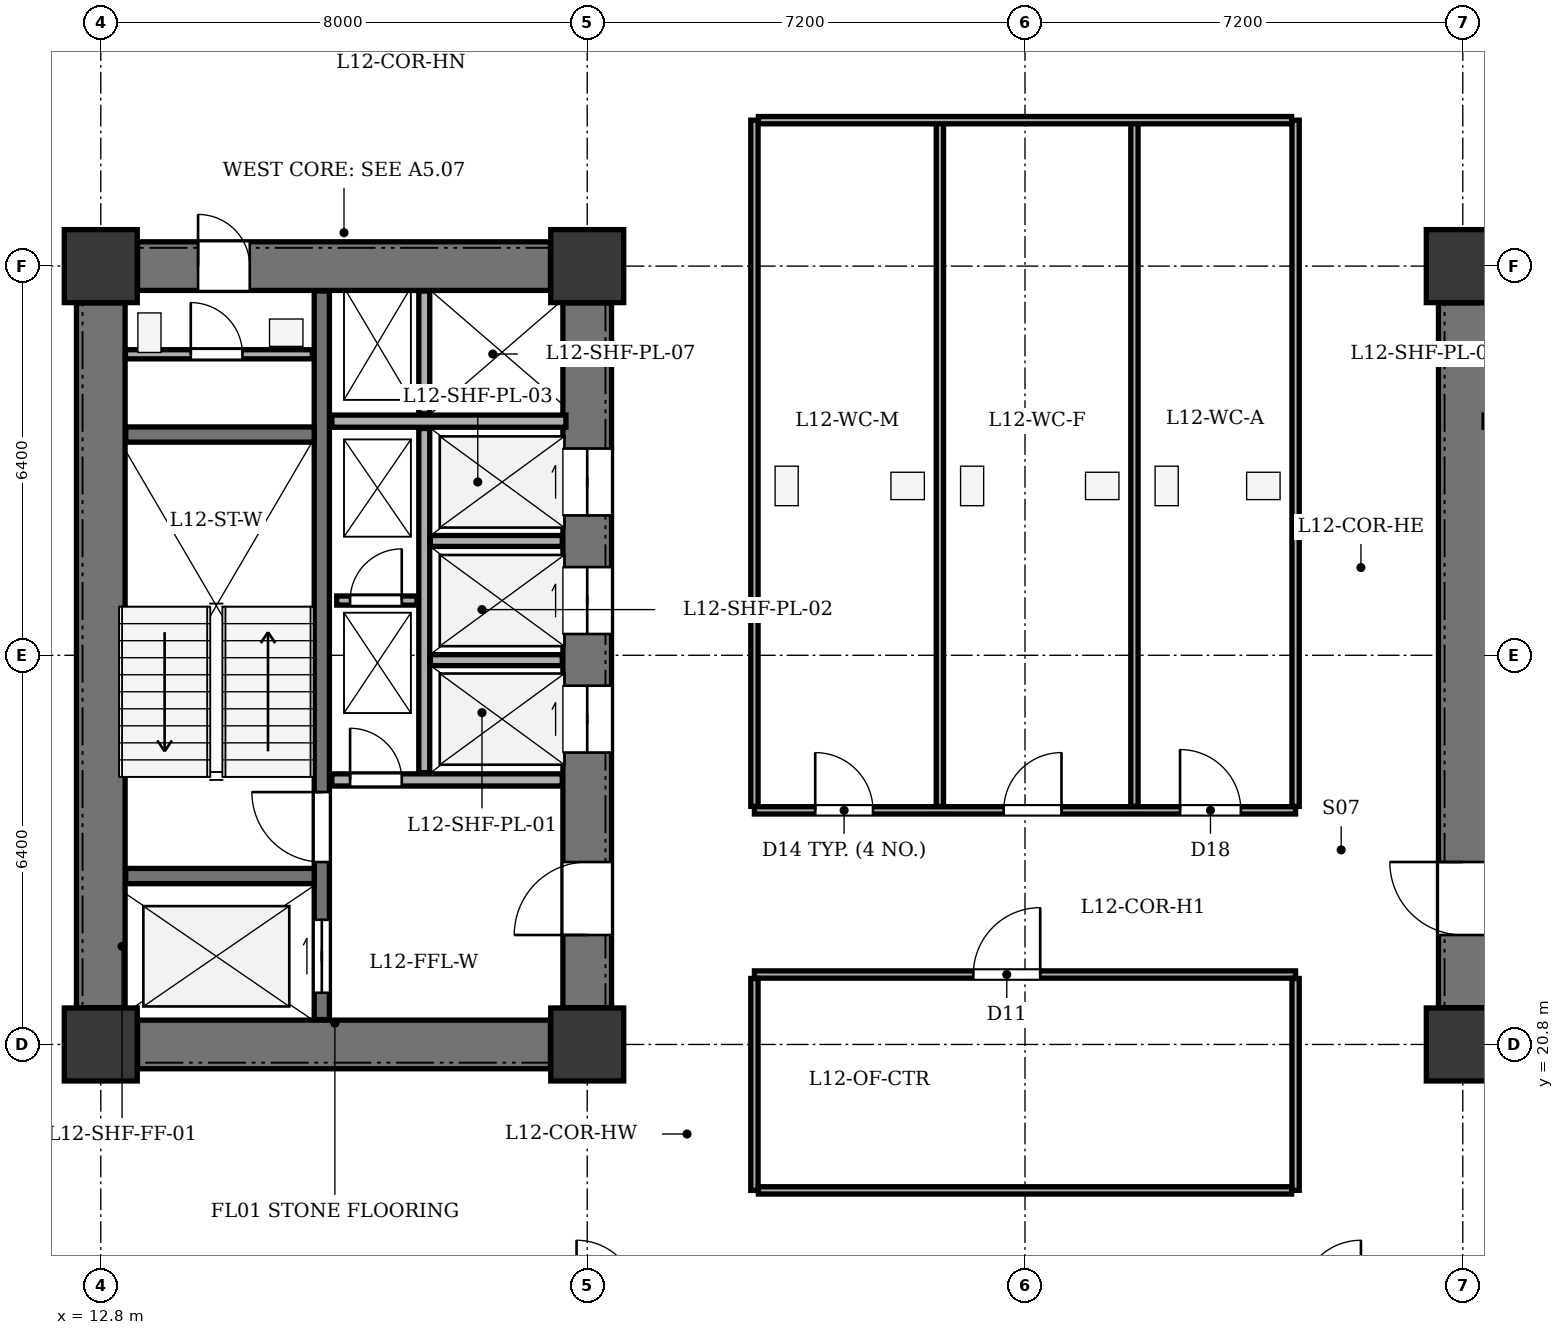
"""IFC4 building model, lengths in metres.
Left out: names, types, materials, properties, quantities, classifications, styles, units other than length and angle.
Written with IfcOpenShell. Run it as: python <this file> out.ifc"""

import sys

from ifc_helpers import new_model, si_unit, direction, frame, frame_2d, origin, origin_2d, place, context, subcontext, project, spatial, rectangle, extrude, element, fill, save


model = new_model("IFC4")
c1 = context("Model", 3, precision=1e-05, world=origin(), true_north=direction((0.0, 1.0)))
c2 = subcontext(c1, "Body", "Model", "MODEL_VIEW")
j1 = project(units=[si_unit("LENGTHUNIT", "METRE"), si_unit("PLANEANGLEUNIT", "RADIAN")], contexts=[c1])
p1 = place(None, origin())
s1 = spatial("IfcSite", under=j1, at=p1, CompositionType="ELEMENT")
p2 = place(p1, origin())
s2 = spatial("IfcBuilding", under=s1, at=p2, CompositionType="ELEMENT")
p3 = place(p2, frame((0.0, 0.0, 51.6)))
s3 = spatial("IfcBuildingStorey", under=s2, at=p3, CompositionType="ELEMENT", Elevation=51.6)
for number, where, z_axis, x_axis in (
    (1, (12.8, 20.8, 0.0), (0.0, 0.0, 1.0), (1.0, 0.0, 0.0)),
    (2, (20.8, 20.8, 0.0), (0.0, 0.0, 1.0), (1.0, 0.0, 0.0)),
    (3, (12.8, 33.6, 0.0), (0.0, 0.0, 1.0), (1.0, 0.0, 0.0)),
    (4, (20.8, 33.6, 0.0), (0.0, 0.0, 1.0), (1.0, 0.0, 0.0)),
    (5, (35.2, 20.8, 0.0), (0.0, 0.0, 1.0), (1.0, 0.0, 0.0)),
    (6, (35.2, 33.6, 0.0), (0.0, 0.0, 1.0), (1.0, 0.0, 0.0)),
):
    element("IfcColumn", number, at=place(p3, frame(where, z_axis=z_axis, x_axis=x_axis)), inside=s3, PredefinedType="COLUMN", context=c2, shape_type="SweptSolid", body=[
        extrude(rectangle(XDim=1.2, YDim=1.2, at=origin_2d()), origin(), (0.0, 0.0, 1.0), 3.9),
    ])
p4 = place(p3, frame((12.8, 21.405, 0.0), z_axis=(0.0, 0.0, 1.0), x_axis=(0.0, 1.0, 0.0)))
e7 = element("IfcWall", 7, at=p4, inside=s3, PredefinedType="SHEAR", context=c2, shape_type="SweptSolid", body=[
    extrude(rectangle(XDim=11.59, YDim=0.8, at=frame_2d((5.795, 0.0))), origin(), (0.0, 0.0, 1.0), 3.6),
])
p5 = place(p3, frame((13.405, 20.8, 0.0), z_axis=(0.0, 0.0, 1.0), x_axis=(1.0, 0.0, 0.0)))
e8 = element("IfcWall", 8, at=p5, inside=s3, PredefinedType="SHEAR", context=c2, shape_type="SweptSolid", body=[
    extrude(rectangle(XDim=6.79, YDim=0.8, at=frame_2d((3.395, 0.0))), origin(), (0.0, 0.0, 1.0), 3.6),
])
p6 = place(p3, frame((13.405, 33.6, 0.0), z_axis=(0.0, 0.0, 1.0), x_axis=(1.0, 0.0, 0.0)))
e9 = element("IfcWall", 9, at=p6, inside=s3, PredefinedType="SHEAR", context=c2, shape_type="SweptSolid", body=[
    extrude(rectangle(XDim=6.79, YDim=0.8, at=frame_2d((3.395, 0.0))), origin(), (0.0, 0.0, 1.0), 3.6),
])
p7 = place(p6, frame((0.995, 0.0, 0.0)))
e10 = element("IfcOpeningElement", 10, at=p7, cuts=e9, PredefinedType="OPENING", context=c2, shape_type="SweptSolid", body=[
    extrude(rectangle(XDim=0.85, YDim=2.02, at=frame_2d((0.425, 1.01))), frame((0.0, 0.41, 0.0), z_axis=(0.0, -1.0, 0.0), x_axis=(1.0, 0.0, 0.0)), (0.0, 0.0, 1.0), 0.82),
])
p8 = place(p3, frame((20.8, 21.405, 0.0), z_axis=(0.0, 0.0, 1.0), x_axis=(0.0, 1.0, 0.0)))
e11 = element("IfcWall", 11, at=p8, inside=s3, PredefinedType="SHEAR", context=c2, shape_type="SweptSolid", body=[
    extrude(rectangle(XDim=11.59, YDim=0.8, at=frame_2d((5.795, 0.0))), origin(), (0.0, 0.0, 1.0), 3.6),
])
p9 = place(p8, frame((1.195, 0.0, 0.0)))
e12 = element("IfcOpeningElement", 12, at=p9, cuts=e11, PredefinedType="OPENING", context=c2, shape_type="SweptSolid", body=[
    extrude(rectangle(XDim=1.2, YDim=2.15, at=frame_2d((0.6, 1.075))), frame((0.0, 0.41, 0.0), z_axis=(0.0, -1.0, 0.0), x_axis=(1.0, 0.0, 0.0)), (0.0, 0.0, 1.0), 0.82),
])
p10 = place(p8, frame((4.195, 0.0, 0.0)))
e13 = element("IfcOpeningElement", 13, at=p10, cuts=e11, PredefinedType="OPENING", context=c2, shape_type="SweptSolid", body=[
    extrude(rectangle(XDim=1.1, YDim=2.1, at=frame_2d((0.55, 1.05))), frame((0.0, 0.41, 0.0), z_axis=(0.0, -1.0, 0.0), x_axis=(1.0, 0.0, 0.0)), (0.0, 0.0, 1.0), 0.82),
])
p11 = place(p8, frame((6.145, 0.0, 0.0)))
e14 = element("IfcOpeningElement", 14, at=p11, cuts=e11, PredefinedType="OPENING", context=c2, shape_type="SweptSolid", body=[
    extrude(rectangle(XDim=1.1, YDim=2.1, at=frame_2d((0.55, 1.05))), frame((0.0, 0.41, 0.0), z_axis=(0.0, -1.0, 0.0), x_axis=(1.0, 0.0, 0.0)), (0.0, 0.0, 1.0), 0.82),
])
p12 = place(p8, frame((8.095, 0.0, 0.0)))
e15 = element("IfcOpeningElement", 15, at=p12, cuts=e11, PredefinedType="OPENING", context=c2, shape_type="SweptSolid", body=[
    extrude(rectangle(XDim=1.1, YDim=2.1, at=frame_2d((0.55, 1.05))), frame((0.0, 0.41, 0.0), z_axis=(0.0, -1.0, 0.0), x_axis=(1.0, 0.0, 0.0)), (0.0, 0.0, 1.0), 0.82),
])
p13 = place(p3, frame((16.435, 21.21, 0.0), z_axis=(0.0, 0.0, 1.0), x_axis=(0.0, 1.0, 0.0)))
e16 = element("IfcWall", 16, at=p13, inside=s3, PredefinedType="SHEAR", context=c2, shape_type="SweptSolid", body=[
    extrude(rectangle(XDim=11.98, YDim=0.25, at=frame_2d((5.99, 0.0))), origin(), (0.0, 0.0, 1.0), 3.6),
])
p14 = place(p13, frame((0.44, 0.0, 0.0)))
e17 = element("IfcOpeningElement", 17, at=p14, cuts=e16, PredefinedType="OPENING", context=c2, shape_type="SweptSolid", body=[
    extrude(rectangle(XDim=1.2, YDim=2.15, at=frame_2d((0.6, 1.075))), frame((0.0, 0.135, 0.0), z_axis=(0.0, -1.0, 0.0), x_axis=(1.0, 0.0, 0.0)), (0.0, 0.0, 1.0), 0.27),
])
p15 = place(p13, frame((2.59, 0.0, 0.0)))
e18 = element("IfcOpeningElement", 18, at=p15, cuts=e16, PredefinedType="OPENING", context=c2, shape_type="SweptSolid", body=[
    extrude(rectangle(XDim=1.15, YDim=2.15, at=frame_2d((0.575, 1.075))), frame((0.0, 0.135, 0.0), z_axis=(0.0, -1.0, 0.0), x_axis=(1.0, 0.0, 0.0)), (0.0, 0.0, 1.0), 0.27),
])
for number, where, z_axis, x_axis in (
    (19, (13.21, 23.57, 0.0), (0.0, 0.0, 1.0), (1.0, 0.0, 0.0)),
    (20, (13.21, 30.83, 0.0), (0.0, 0.0, 1.0), (1.0, 0.0, 0.0)),
):
    element("IfcWall", number, at=place(p3, frame(where, z_axis=z_axis, x_axis=x_axis)), inside=s3, PredefinedType="SHEAR", context=c2, shape_type="SweptSolid", body=[
        extrude(rectangle(XDim=3.1, YDim=0.25, at=frame_2d((1.55, 0.0))), origin(), (0.0, 0.0, 1.0), 3.6),
    ])
p16 = place(p3, frame((16.6, 25.15, 0.0), z_axis=(0.0, 0.0, 1.0), x_axis=(1.0, 0.0, 0.0)))
e21 = element("IfcWall", 21, at=p16, inside=s3, PredefinedType="SOLIDWALL", context=c2, shape_type="SweptSolid", body=[
    extrude(rectangle(XDim=3.79, YDim=0.2, at=frame_2d((1.895, 0.0))), origin(), (0.0, 0.0, 1.0), 3.6),
])
p17 = place(p16, frame((0.3, 0.0, 0.0)))
e22 = element("IfcOpeningElement", 22, at=p17, cuts=e21, PredefinedType="OPENING", context=c2, shape_type="SweptSolid", body=[
    extrude(rectangle(XDim=0.85, YDim=2.02, at=frame_2d((0.425, 1.01))), frame((0.0, 0.11, 0.0), z_axis=(0.0, -1.0, 0.0), x_axis=(1.0, 0.0, 0.0)), (0.0, 0.0, 1.0), 0.22),
])
p18 = place(p3, frame((16.6, 31.05, 0.0), z_axis=(0.0, 0.0, 1.0), x_axis=(1.0, 0.0, 0.0)))
e23 = element("IfcWall", 23, at=p18, inside=s3, PredefinedType="SOLIDWALL", context=c2, shape_type="SweptSolid", body=[
    extrude(rectangle(XDim=3.85, YDim=0.2, at=frame_2d((1.925, 0.0))), origin(), (0.0, 0.0, 1.0), 3.6),
])
p19 = place(p3, frame((18.12, 25.27, 0.0), z_axis=(0.0, 0.0, 1.0), x_axis=(0.0, 1.0, 0.0)))
e24 = element("IfcWall", 24, at=p19, inside=s3, PredefinedType="PARTITIONING", context=c2, shape_type="SweptSolid", body=[
    extrude(rectangle(XDim=5.66, YDim=0.18, at=frame_2d((2.83, 0.0))), origin(), (0.0, 0.0, 1.0), 3.6),
])
p20 = place(p3, frame((18.12, 31.17, 0.0), z_axis=(0.0, 0.0, 1.0), x_axis=(0.0, 1.0, 0.0)))
e25 = element("IfcWall", 25, at=p20, inside=s3, PredefinedType="PARTITIONING", context=c2, shape_type="SweptSolid", body=[
    extrude(rectangle(XDim=2.02, YDim=0.18, at=frame_2d((1.01, 0.0))), origin(), (0.0, 0.0, 1.0), 3.6),
])
for number, where, z_axis, x_axis in (
    (26, (18.22, 27.12, 0.0), (0.0, 0.0, 1.0), (1.0, 0.0, 0.0)),
    (27, (18.22, 29.08, 0.0), (0.0, 0.0, 1.0), (1.0, 0.0, 0.0)),
):
    element("IfcWall", number, at=place(p3, frame(where, z_axis=z_axis, x_axis=x_axis)), inside=s3, PredefinedType="PARTITIONING", context=c2, shape_type="SweptSolid", body=[
        extrude(rectangle(XDim=2.17, YDim=0.18, at=frame_2d((1.085, 0.0))), origin(), (0.0, 0.0, 1.0), 3.6),
    ])
p21 = place(p3, frame((35.2, 21.405, 0.0), z_axis=(0.0, 0.0, 1.0), x_axis=(0.0, 1.0, 0.0)))
e28 = element("IfcWall", 28, at=p21, inside=s3, PredefinedType="SHEAR", context=c2, shape_type="SweptSolid", body=[
    extrude(rectangle(XDim=11.59, YDim=0.8, at=frame_2d((5.795, 0.0))), origin(), (0.0, 0.0, 1.0), 3.6),
])
p22 = place(p21, frame((1.195, 0.0, 0.0)))
e29 = element("IfcOpeningElement", 29, at=p22, cuts=e28, PredefinedType="OPENING", context=c2, shape_type="SweptSolid", body=[
    extrude(rectangle(XDim=1.2, YDim=2.15, at=frame_2d((0.6, 1.075))), frame((0.0, 0.41, 0.0), z_axis=(0.0, -1.0, 0.0), x_axis=(1.0, 0.0, 0.0)), (0.0, 0.0, 1.0), 0.82),
])
p23 = place(p3, frame((13.205, 32.15, 0.0), z_axis=(0.0, 0.0, 1.0), x_axis=(1.0, 0.0, 0.0)))
e30 = element("IfcWall", 30, at=p23, inside=s3, PredefinedType="PARTITIONING", context=c2, shape_type="SweptSolid", body=[
    extrude(rectangle(XDim=3.075, YDim=0.15, at=frame_2d((1.538, 0.0))), origin(), (0.0, 0.0, 1.0), 3.6),
])
p24 = place(p23, frame((1.075, 0.0, 0.0)))
e31 = element("IfcOpeningElement", 31, at=p24, cuts=e30, PredefinedType="OPENING", context=c2, shape_type="SweptSolid", body=[
    extrude(rectangle(XDim=0.85, YDim=2.02, at=frame_2d((0.425, 1.01))), frame((0.0, 0.085, 0.0), z_axis=(0.0, -1.0, 0.0), x_axis=(1.0, 0.0, 0.0)), (0.0, 0.0, 1.0), 0.17),
])
p25 = place(p3, frame((16.68, 28.1, 0.0), z_axis=(0.0, 0.0, 1.0), x_axis=(1.0, 0.0, 0.0)))
e32 = element("IfcWall", 32, at=p25, inside=s3, PredefinedType="PARTITIONING", context=c2, shape_type="SweptSolid", body=[
    extrude(rectangle(XDim=1.32, YDim=0.15, at=frame_2d((0.66, 0.0))), origin(), (0.0, 0.0, 1.0), 3.6),
])
p26 = place(p25, frame((0.22, 0.0, 0.0)))
e33 = element("IfcOpeningElement", 33, at=p26, cuts=e32, PredefinedType="OPENING", context=c2, shape_type="SweptSolid", body=[
    extrude(rectangle(XDim=0.85, YDim=2.02, at=frame_2d((0.425, 1.01))), frame((0.0, 0.085, 0.0), z_axis=(0.0, -1.0, 0.0), x_axis=(1.0, 0.0, 0.0)), (0.0, 0.0, 1.0), 0.17),
])
p27 = place(p3, frame((23.55, 24.65, 0.0), z_axis=(0.0, 0.0, 1.0), x_axis=(1.0, 0.0, 0.0)))
e34 = element("IfcWall", 34, at=p27, inside=s3, PredefinedType="PARTITIONING", context=c2, shape_type="SweptSolid", body=[
    extrude(rectangle(XDim=8.9, YDim=0.12, at=frame_2d((4.45, 0.0))), origin(), (0.0, 0.0, 1.0), 3.135),
])
p28 = place(p27, frame((1.0, 0.0, 0.0)))
e35 = element("IfcOpeningElement", 35, at=p28, cuts=e34, PredefinedType="OPENING", context=c2, shape_type="SweptSolid", body=[
    extrude(rectangle(XDim=0.95, YDim=2.1, at=frame_2d((0.475, 1.05))), frame((0.0, 0.07, 0.0), z_axis=(0.0, -1.0, 0.0), x_axis=(1.0, 0.0, 0.0)), (0.0, 0.0, 1.0), 0.14),
])
p29 = place(p27, frame((4.1, 0.0, 0.0)))
e36 = element("IfcOpeningElement", 36, at=p29, cuts=e34, PredefinedType="OPENING", context=c2, shape_type="SweptSolid", body=[
    extrude(rectangle(XDim=0.95, YDim=2.1, at=frame_2d((0.475, 1.05))), frame((0.0, 0.07, 0.0), z_axis=(0.0, -1.0, 0.0), x_axis=(1.0, 0.0, 0.0)), (0.0, 0.0, 1.0), 0.14),
])
p30 = place(p27, frame((7.0, 0.0, 0.0)))
e37 = element("IfcOpeningElement", 37, at=p30, cuts=e34, PredefinedType="OPENING", context=c2, shape_type="SweptSolid", body=[
    extrude(rectangle(XDim=1.0, YDim=2.1, at=frame_2d((0.5, 1.05))), frame((0.0, 0.07, 0.0), z_axis=(0.0, -1.0, 0.0), x_axis=(1.0, 0.0, 0.0)), (0.0, 0.0, 1.0), 0.14),
])
for number, where, z_axis, x_axis in (
    (38, (23.55, 24.715, 0.0), (0.0, 0.0, 1.0), (0.0, 1.0, 0.0)),
    (39, (32.45, 24.715, 0.0), (0.0, 0.0, 1.0), (0.0, 1.0, 0.0)),
    (40, (26.6, 24.715, 0.0), (0.0, 0.0, 1.0), (0.0, 1.0, 0.0)),
):
    element("IfcWall", number, at=place(p3, frame(where, z_axis=z_axis, x_axis=x_axis)), inside=s3, PredefinedType="PARTITIONING", context=c2, shape_type="SweptSolid", body=[
        extrude(rectangle(XDim=11.285, YDim=0.12, at=frame_2d((5.643, 0.0))), origin(), (0.0, 0.0, 1.0), 3.6),
    ])
p31 = place(p3, frame((29.8, 24.715, 0.0), z_axis=(0.0, 0.0, 1.0), x_axis=(0.0, 1.0, 0.0)))
e41 = element("IfcWall", 41, at=p31, inside=s3, PredefinedType="PARTITIONING", context=c2, shape_type="SweptSolid", body=[
    extrude(rectangle(XDim=11.285, YDim=0.12, at=frame_2d((5.643, 0.0))), origin(), (0.0, 0.0, 1.0), 3.135),
])
p32 = place(p3, frame((23.615, 36.0, 0.0), z_axis=(0.0, 0.0, 1.0), x_axis=(1.0, 0.0, 0.0)))
e42 = element("IfcWall", 42, at=p32, inside=s3, PredefinedType="PARTITIONING", context=c2, shape_type="SweptSolid", body=[
    extrude(rectangle(XDim=8.77, YDim=0.12, at=frame_2d((4.385, 0.0))), origin(), (0.0, 0.0, 1.0), 3.6),
])
p33 = place(p3, frame((23.55, 21.95, 0.0), z_axis=(0.0, 0.0, 1.0), x_axis=(1.0, 0.0, 0.0)))
e43 = element("IfcWall", 43, at=p33, inside=s3, PredefinedType="PARTITIONING", context=c2, shape_type="SweptSolid", body=[
    extrude(rectangle(XDim=8.9, YDim=0.12, at=frame_2d((4.45, 0.0))), origin(), (0.0, 0.0, 1.0), 3.135),
])
p34 = place(p33, frame((3.6, 0.0, 0.0)))
e44 = element("IfcOpeningElement", 44, at=p34, cuts=e43, PredefinedType="OPENING", context=c2, shape_type="SweptSolid", body=[
    extrude(rectangle(XDim=1.1, YDim=2.15, at=frame_2d((0.55, 1.075))), frame((0.0, 0.07, 0.0), z_axis=(0.0, -1.0, 0.0), x_axis=(1.0, 0.0, 0.0)), (0.0, 0.0, 1.0), 0.14),
])
for number, where, z_axis, x_axis in (
    (45, (23.55, 18.4, 0.0), (0.0, 0.0, 1.0), (0.0, 1.0, 0.0)),
    (46, (32.45, 18.4, 0.0), (0.0, 0.0, 1.0), (0.0, 1.0, 0.0)),
):
    element("IfcWall", number, at=place(p3, frame(where, z_axis=z_axis, x_axis=x_axis)), inside=s3, PredefinedType="PARTITIONING", context=c2, shape_type="SweptSolid", body=[
        extrude(rectangle(XDim=3.485, YDim=0.12, at=frame_2d((1.743, 0.0))), origin(), (0.0, 0.0, 1.0), 3.6),
    ])
p35 = place(p3, frame((23.615, 18.4, 0.0), z_axis=(0.0, 0.0, 1.0), x_axis=(1.0, 0.0, 0.0)))
e47 = element("IfcWall", 47, at=p35, inside=s3, PredefinedType="PARTITIONING", context=c2, shape_type="SweptSolid", body=[
    extrude(rectangle(XDim=8.77, YDim=0.12, at=frame_2d((4.385, 0.0))), origin(), (0.0, 0.0, 1.0), 3.6),
])
p36 = place(p7, origin())
e48 = element("IfcDoor", 48, at=p36, inside=s3, OperationType="SINGLE_SWING_LEFT", PredefinedType="DOOR", context=c2, shape_type="SweptSolid", body=[
    extrude(rectangle(XDim=0.85, YDim=2.02, at=frame_2d((0.425, 1.01))), frame((0.0, 0.025, 0.0), z_axis=(0.0, -1.0, 0.0), x_axis=(1.0, 0.0, 0.0)), (0.0, 0.0, 1.0), 0.05),
])
fill(e10, e48)
p37 = place(p9, origin())
e49 = element("IfcDoor", 49, at=p37, inside=s3, OperationType="SINGLE_SWING_LEFT", PredefinedType="DOOR", context=c2, shape_type="SweptSolid", body=[
    extrude(rectangle(XDim=1.2, YDim=2.15, at=frame_2d((0.6, 1.075))), frame((0.0, 0.025, 0.0), z_axis=(0.0, -1.0, 0.0), x_axis=(1.0, 0.0, 0.0)), (0.0, 0.0, 1.0), 0.05),
])
fill(e12, e49)
p38 = place(p10, origin())
e50 = element("IfcDoor", 50, at=p38, inside=s3, OperationType="DOUBLE_DOOR_SLIDING", PredefinedType="DOOR", context=c2, shape_type="SweptSolid", body=[
    extrude(rectangle(XDim=1.1, YDim=2.1, at=frame_2d((0.55, 1.05))), frame((0.0, 0.025, 0.0), z_axis=(0.0, -1.0, 0.0), x_axis=(1.0, 0.0, 0.0)), (0.0, 0.0, 1.0), 0.05),
])
fill(e13, e50)
p39 = place(p11, origin())
e51 = element("IfcDoor", 51, at=p39, inside=s3, OperationType="DOUBLE_DOOR_SLIDING", PredefinedType="DOOR", context=c2, shape_type="SweptSolid", body=[
    extrude(rectangle(XDim=1.1, YDim=2.1, at=frame_2d((0.55, 1.05))), frame((0.0, 0.025, 0.0), z_axis=(0.0, -1.0, 0.0), x_axis=(1.0, 0.0, 0.0)), (0.0, 0.0, 1.0), 0.05),
])
fill(e14, e51)
p40 = place(p12, origin())
e52 = element("IfcDoor", 52, at=p40, inside=s3, OperationType="DOUBLE_DOOR_SLIDING", PredefinedType="DOOR", context=c2, shape_type="SweptSolid", body=[
    extrude(rectangle(XDim=1.1, YDim=2.1, at=frame_2d((0.55, 1.05))), frame((0.0, 0.025, 0.0), z_axis=(0.0, -1.0, 0.0), x_axis=(1.0, 0.0, 0.0)), (0.0, 0.0, 1.0), 0.05),
])
fill(e15, e52)
p41 = place(p14, origin())
e53 = element("IfcDoor", 53, at=p41, inside=s3, OperationType="DOUBLE_DOOR_SLIDING", PredefinedType="DOOR", context=c2, shape_type="SweptSolid", body=[
    extrude(rectangle(XDim=1.2, YDim=2.15, at=frame_2d((0.6, 1.075))), frame((0.0, 0.025, 0.0), z_axis=(0.0, -1.0, 0.0), x_axis=(1.0, 0.0, 0.0)), (0.0, 0.0, 1.0), 0.05),
])
fill(e17, e53)
p42 = place(p15, origin())
e54 = element("IfcDoor", 54, at=p42, inside=s3, OperationType="SINGLE_SWING_RIGHT", PredefinedType="DOOR", context=c2, shape_type="SweptSolid", body=[
    extrude(rectangle(XDim=1.15, YDim=2.15, at=frame_2d((0.575, 1.075))), frame((0.0, 0.025, 0.0), z_axis=(0.0, -1.0, 0.0), x_axis=(1.0, 0.0, 0.0)), (0.0, 0.0, 1.0), 0.05),
])
fill(e18, e54)
p43 = place(p17, origin())
e55 = element("IfcDoor", 55, at=p43, inside=s3, OperationType="SINGLE_SWING_LEFT", PredefinedType="DOOR", context=c2, shape_type="SweptSolid", body=[
    extrude(rectangle(XDim=0.85, YDim=2.02, at=frame_2d((0.425, 1.01))), frame((0.0, 0.025, 0.0), z_axis=(0.0, -1.0, 0.0), x_axis=(1.0, 0.0, 0.0)), (0.0, 0.0, 1.0), 0.05),
])
fill(e22, e55)
p44 = place(p22, origin())
e56 = element("IfcDoor", 56, at=p44, inside=s3, OperationType="SINGLE_SWING_RIGHT", PredefinedType="DOOR", context=c2, shape_type="SweptSolid", body=[
    extrude(rectangle(XDim=1.2, YDim=2.15, at=frame_2d((0.6, 1.075))), frame((0.0, 0.025, 0.0), z_axis=(0.0, -1.0, 0.0), x_axis=(1.0, 0.0, 0.0)), (0.0, 0.0, 1.0), 0.05),
])
fill(e29, e56)
p45 = place(p24, origin())
e57 = element("IfcDoor", 57, at=p45, inside=s3, OperationType="SINGLE_SWING_LEFT", PredefinedType="DOOR", context=c2, shape_type="SweptSolid", body=[
    extrude(rectangle(XDim=0.85, YDim=2.02, at=frame_2d((0.425, 1.01))), frame((0.0, 0.025, 0.0), z_axis=(0.0, -1.0, 0.0), x_axis=(1.0, 0.0, 0.0)), (0.0, 0.0, 1.0), 0.05),
])
fill(e31, e57)
p46 = place(p26, origin())
e58 = element("IfcDoor", 58, at=p46, inside=s3, OperationType="SINGLE_SWING_RIGHT", PredefinedType="DOOR", context=c2, shape_type="SweptSolid", body=[
    extrude(rectangle(XDim=0.85, YDim=2.02, at=frame_2d((0.425, 1.01))), frame((0.0, 0.025, 0.0), z_axis=(0.0, -1.0, 0.0), x_axis=(1.0, 0.0, 0.0)), (0.0, 0.0, 1.0), 0.05),
])
fill(e33, e58)
p47 = place(p28, origin())
e59 = element("IfcDoor", 59, at=p47, inside=s3, OperationType="SINGLE_SWING_LEFT", PredefinedType="DOOR", context=c2, shape_type="SweptSolid", body=[
    extrude(rectangle(XDim=0.95, YDim=2.1, at=frame_2d((0.475, 1.05))), frame((0.0, 0.025, 0.0), z_axis=(0.0, -1.0, 0.0), x_axis=(1.0, 0.0, 0.0)), (0.0, 0.0, 1.0), 0.05),
])
fill(e35, e59)
p48 = place(p29, origin())
e60 = element("IfcDoor", 60, at=p48, inside=s3, OperationType="SINGLE_SWING_RIGHT", PredefinedType="DOOR", context=c2, shape_type="SweptSolid", body=[
    extrude(rectangle(XDim=0.95, YDim=2.1, at=frame_2d((0.475, 1.05))), frame((0.0, 0.025, 0.0), z_axis=(0.0, -1.0, 0.0), x_axis=(1.0, 0.0, 0.0)), (0.0, 0.0, 1.0), 0.05),
])
fill(e36, e60)
p49 = place(p30, origin())
e61 = element("IfcDoor", 61, at=p49, inside=s3, OperationType="SINGLE_SWING_LEFT", PredefinedType="DOOR", context=c2, shape_type="SweptSolid", body=[
    extrude(rectangle(XDim=1.0, YDim=2.1, at=frame_2d((0.5, 1.05))), frame((0.0, 0.025, 0.0), z_axis=(0.0, -1.0, 0.0), x_axis=(1.0, 0.0, 0.0)), (0.0, 0.0, 1.0), 0.05),
])
fill(e37, e61)
p50 = place(p34, origin())
e62 = element("IfcDoor", 62, at=p50, inside=s3, OperationType="SINGLE_SWING_RIGHT", PredefinedType="DOOR", context=c2, shape_type="SweptSolid", body=[
    extrude(rectangle(XDim=1.1, YDim=2.15, at=frame_2d((0.55, 1.075))), frame((0.0, 0.025, 0.0), z_axis=(0.0, -1.0, 0.0), x_axis=(1.0, 0.0, 0.0)), (0.0, 0.0, 1.0), 0.05),
])
fill(e44, e62)
save(model, sys.argv[1])
